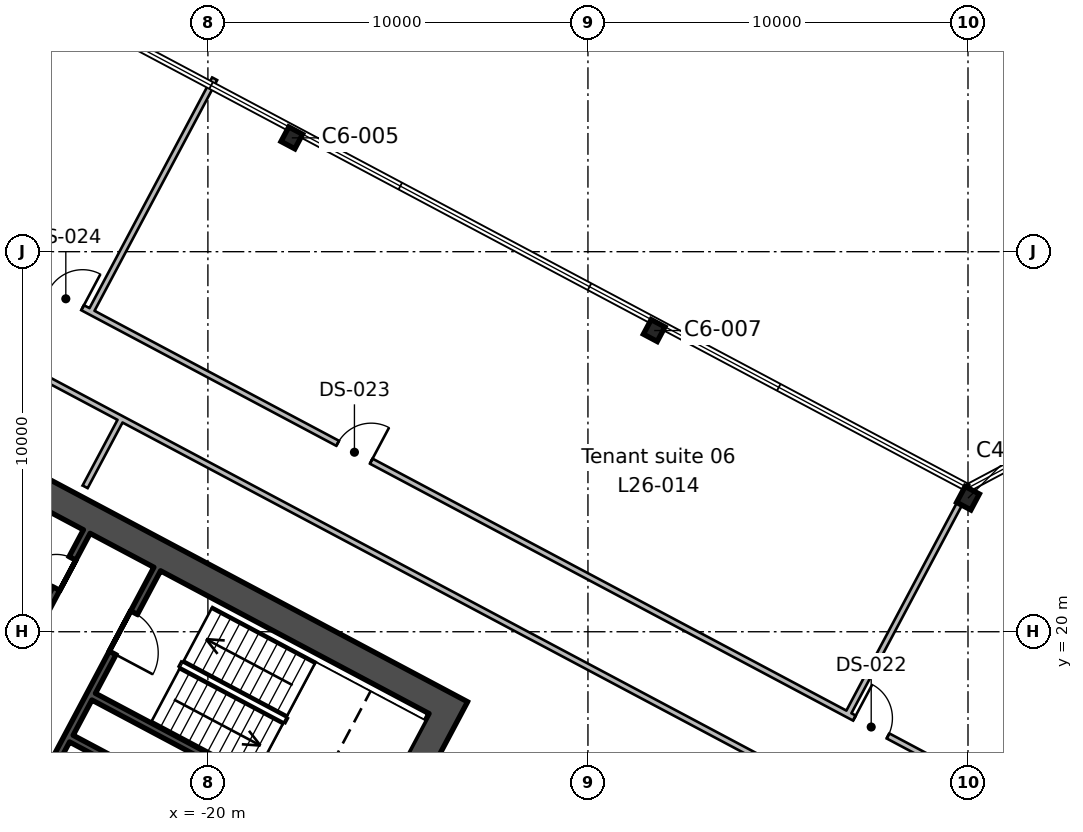
"""IFC4 building model, lengths in metres.
Left out: names, types, materials, properties, quantities, classifications, styles, units other than length and angle.
Written with IfcOpenShell. Run it as: python <this file> out.ifc"""

import sys

from ifc_helpers import new_model, si_unit, direction, frame, frame_2d, origin, origin_2d, place, context, subcontext, project, spatial, rectangle, i_section, extrude, element, fill, save


model = new_model("IFC4")
c1 = context("Model", 3, precision=1e-05, world=origin(), true_north=direction((0.0, 1.0)))
c2 = subcontext(c1, "Body", "Model", "MODEL_VIEW")
j1 = project(units=[si_unit("LENGTHUNIT", "METRE"), si_unit("PLANEANGLEUNIT", "RADIAN")], contexts=[c1])
p1 = place(None, origin())
s1 = spatial("IfcSite", under=j1, at=p1, CompositionType="ELEMENT")
p2 = place(p1, origin())
s2 = spatial("IfcBuilding", under=s1, at=p2, CompositionType="ELEMENT")
p3 = place(p2, frame((0.0, 0.0, 130.2)))
s3 = spatial("IfcBuildingStorey", under=s2, at=p3, CompositionType="ELEMENT", Elevation=130.2)
p4 = place(p3, frame((0.0, 23.514, 0.0), z_axis=(0.0, 0.0, 1.0), x_axis=(-0.882947592859, 0.469471562786, 0.0)))
e1 = element("IfcColumn", 1, at=p4, inside=s3, PredefinedType="COLUMN", context=c2, shape_type="SweptSolid", body=[
    extrude(i_section(OverallWidth=0.424, OverallDepth=0.475, WebThickness=0.048, FlangeThickness=0.077, FilletRadius=0.015, at=origin_2d()), origin(), (0.0, 0.0, 1.0), 4.0),
])
for number, where, z_axis, x_axis in (
    (2, (-8.257, 27.925, 0.0), (0.0, 0.0, 1.0), (-0.883, 0.469, 0.0)),
    (3, (-17.792, 32.995, 0.0), (0.0, 0.0, 1.0), (-0.883, 0.469, 0.0)),
):
    element("IfcColumn", number, at=place(p3, frame(where, z_axis=z_axis, x_axis=x_axis)), inside=s3, PredefinedType="COLUMN", context=c2, shape_type="SweptSolid", body=[
        extrude(i_section(OverallWidth=0.412, OverallDepth=0.434, WebThickness=0.036, FlangeThickness=0.057, FilletRadius=0.015, at=origin_2d()), origin(), (0.0, 0.0, 1.0), 4.0),
    ])
p5 = place(p3, frame((-13.498, 18.333, 0.0), z_axis=(0.0, 0.0, 1.0), x_axis=(-0.469469918705, -0.88294846703, 0.0)))
e4 = element("IfcWall", 4, at=p5, inside=s3, PredefinedType="SHEAR", context=c2, shape_type="SweptSolid", body=[
    extrude(rectangle(XDim=19.7, YDim=0.75, at=frame_2d((9.85, 0.0))), origin(), (0.0, 0.0, 1.0), 4.0),
])
p6 = place(p5, frame((6.85, 0.0, 0.0)))
e5 = element("IfcOpeningElement", 5, at=p6, cuts=e4, PredefinedType="OPENING", context=c2, shape_type="SweptSolid", body=[
    extrude(rectangle(XDim=2.4, YDim=2.4, at=frame_2d((1.2, 1.2))), frame((0.0, 0.385, 0.0), z_axis=(0.0, -1.0, 0.0), x_axis=(1.0, 0.0, 0.0)), (0.0, 0.0, 1.0), 0.77),
])
p7 = place(p3, frame((-14.005, 18.178, 0.0), z_axis=(0.0, 0.0, 1.0), x_axis=(-0.88295010195, 0.469466843842, 0.0)))
e6 = element("IfcWall", 6, at=p7, inside=s3, PredefinedType="SHEAR", context=c2, shape_type="SweptSolid", body=[
    extrude(rectangle(XDim=20.2, YDim=0.75, at=frame_2d((10.1, 0.0))), origin(), (0.0, 0.0, 1.0), 4.0),
])
p8 = place(p3, frame((-21.333, 21.649, 0.0), z_axis=(0.0, 0.0, 1.0), x_axis=(-0.469494272526, -0.882935517501, 0.0)))
e7 = element("IfcWall", 7, at=p8, inside=s3, PredefinedType="SHEAR", context=c2, shape_type="SweptSolid", body=[
    extrude(rectangle(XDim=7.3, YDim=0.2, at=frame_2d((3.65, 0.0))), origin(), (0.0, 0.0, 1.0), 4.0),
])
p9 = place(p8, frame((1.3, 0.0, 0.0)))
e8 = element("IfcOpeningElement", 8, at=p9, cuts=e7, PredefinedType="OPENING", context=c2, shape_type="SweptSolid", body=[
    extrude(rectangle(XDim=1.2, YDim=2.1, at=frame_2d((0.6, 1.05))), frame((0.0, 0.11, 0.0), z_axis=(0.0, -1.0, 0.0), x_axis=(1.0, 0.0, 0.0)), (0.0, 0.0, 1.0), 0.22),
])
p10 = place(p3, frame((-23.188, 22.635, 0.0), z_axis=(0.0, 0.0, 1.0), x_axis=(-0.469454336211, -0.882956752176, 0.0)))
e9 = element("IfcWall", 9, at=p10, inside=s3, PredefinedType="SHEAR", context=c2, shape_type="SweptSolid", body=[
    extrude(rectangle(XDim=7.3, YDim=0.2, at=frame_2d((3.65, 0.0))), origin(), (0.0, 0.0, 1.0), 4.0),
])
p11 = place(p10, frame((0.8, 0.0, 0.0)))
e10 = element("IfcOpeningElement", 10, at=p11, cuts=e9, PredefinedType="OPENING", context=c2, shape_type="SweptSolid", body=[
    extrude(rectangle(XDim=0.9, YDim=2.1, at=frame_2d((0.45, 1.05))), frame((0.0, 0.11, 0.0), z_axis=(0.0, -1.0, 0.0), x_axis=(1.0, 0.0, 0.0)), (0.0, 0.0, 1.0), 0.22),
])
p12 = place(p10, frame((3.3, 0.0, 0.0)))
e11 = element("IfcOpeningElement", 11, at=p12, cuts=e9, PredefinedType="OPENING", context=c2, shape_type="SweptSolid", body=[
    extrude(rectangle(XDim=0.9, YDim=2.1, at=frame_2d((0.45, 1.05))), frame((0.0, 0.11, 0.0), z_axis=(0.0, -1.0, 0.0), x_axis=(1.0, 0.0, 0.0)), (0.0, 0.0, 1.0), 0.22),
])
p13 = place(p3, frame((-15.942, 14.536, 0.0), z_axis=(0.0, 0.0, 1.0), x_axis=(-0.882946947542, 0.469472776449, 0.0)))
e12 = element("IfcWall", 12, at=p13, inside=s3, PredefinedType="SHEAR", context=c2, shape_type="SweptSolid", body=[
    extrude(rectangle(XDim=8.0, YDim=0.2, at=frame_2d((4.0, 0.0))), origin(), (0.0, 0.0, 1.0), 4.0),
])
p14 = place(p3, frame((-16.529, 13.432, 0.0), z_axis=(0.0, 0.0, 1.0), x_axis=(-0.88295287151, 0.469461634952, 0.0)))
e13 = element("IfcWall", 13, at=p14, inside=s3, PredefinedType="SHEAR", context=c2, shape_type="SweptSolid", body=[
    extrude(rectangle(XDim=8.0, YDim=0.2, at=frame_2d((4.0, 0.0))), origin(), (0.0, 0.0, 1.0), 4.0),
])
p15 = place(p3, frame((-33.0, 31.307, 0.0), z_axis=(0.0, 0.0, 1.0), x_axis=(0.882966008295, -0.469436926748, 0.0)))
e14 = element("IfcWall", 14, at=p15, inside=s3, PredefinedType="PARTITIONING", context=c2, shape_type="SweptSolid", body=[
    extrude(rectangle(XDim=12.144, YDim=0.15, at=frame_2d((6.072, 0.0))), origin(), (0.0, 0.0, 1.0), 3.64),
])
p16 = place(p3, frame((-19.822, 34.55, 0.0), z_axis=(0.0, 0.0, 1.0), x_axis=(-0.469455680488, -0.882956037443, 0.0)))
e15 = element("IfcWall", 15, at=p16, inside=s3, PredefinedType="PARTITIONING", context=c2, shape_type="SweptSolid", body=[
    extrude(rectangle(XDim=6.95, YDim=0.15, at=frame_2d((3.475, 0.0))), origin(), (0.0, 0.0, 1.0), 3.64),
])
p17 = place(p3, frame((-32.258, 33.291, 0.0), z_axis=(0.0, 0.0, 1.0), x_axis=(0.882945475173, -0.469475545552, 0.0)))
e16 = element("IfcWall", 16, at=p17, inside=s3, PredefinedType="PARTITIONING", context=c2, shape_type="SweptSolid", body=[
    extrude(rectangle(XDim=36.535, YDim=0.15, at=frame_2d((18.267, 0.0))), origin(), (0.0, 0.0, 1.0), 3.64),
])
p18 = place(p17, frame((33.15, 0.0, 0.0)))
e17 = element("IfcOpeningElement", 17, at=p18, cuts=e16, PredefinedType="OPENING", context=c2, shape_type="SweptSolid", body=[
    extrude(rectangle(XDim=1.0, YDim=2.1, at=frame_2d((0.5, 1.05))), frame((0.0, 0.085, 0.0), z_axis=(0.0, -1.0, 0.0), x_axis=(1.0, 0.0, 0.0)), (0.0, 0.0, 1.0), 0.17),
])
p19 = place(p17, frame((17.75, 0.0, 0.0)))
e18 = element("IfcOpeningElement", 18, at=p19, cuts=e16, PredefinedType="OPENING", context=c2, shape_type="SweptSolid", body=[
    extrude(rectangle(XDim=1.0, YDim=2.1, at=frame_2d((0.5, 1.05))), frame((0.0, 0.085, 0.0), z_axis=(0.0, -1.0, 0.0), x_axis=(1.0, 0.0, 0.0)), (0.0, 0.0, 1.0), 0.17),
])
p20 = place(p17, frame((9.149, 0.0, 0.0)))
e19 = element("IfcOpeningElement", 19, at=p20, cuts=e16, PredefinedType="OPENING", context=c2, shape_type="SweptSolid", body=[
    extrude(rectangle(XDim=1.0, YDim=2.1, at=frame_2d((0.5, 1.05))), frame((0.0, 0.085, 0.0), z_axis=(0.0, -1.0, 0.0), x_axis=(1.0, 0.0, 0.0)), (0.0, 0.0, 1.0), 0.17),
])
p21 = place(p3, frame((0.0, 16.139, 0.0), z_axis=(0.0, 0.0, 1.0), x_axis=(0.882958532279, 0.469450988151, 0.0)))
e20 = element("IfcWall", 20, at=p21, inside=s3, PredefinedType="PARTITIONING", context=c2, shape_type="SweptSolid", body=[
    extrude(rectangle(XDim=18.648, YDim=0.15, at=frame_2d((9.324, 0.0))), origin(), (0.0, 0.0, 1.0), 3.64),
])
p22 = place(p21, frame((14.25, 0.0, 0.0)))
e21 = element("IfcOpeningElement", 21, at=p22, cuts=e20, PredefinedType="OPENING", context=c2, shape_type="SweptSolid", body=[
    extrude(rectangle(XDim=1.0, YDim=2.1, at=frame_2d((0.5, 1.05))), frame((0.0, 0.085, 0.0), z_axis=(0.0, -1.0, 0.0), x_axis=(1.0, 0.0, 0.0)), (0.0, 0.0, 1.0), 0.17),
])
p23 = place(p3, frame((-22.277, 25.606, 0.0), z_axis=(0.0, 0.0, 1.0), x_axis=(-0.469295881328, -0.88304098193, 0.0)))
e22 = element("IfcWall", 22, at=p23, inside=s3, PredefinedType="PARTITIONING", context=c2, shape_type="SweptSolid", body=[
    extrude(rectangle(XDim=2.031, YDim=0.15, at=frame_2d((1.015, 0.0))), origin(), (0.0, 0.0, 1.0), 3.64),
])
p24 = place(p3, frame((-0.074, 13.8, 0.0), z_axis=(0.0, 0.0, 1.0), x_axis=(-0.8829426933, 0.4694807774, 0.0)))
e23 = element("IfcWall", 23, at=p24, inside=s3, PredefinedType="PARTITIONING", context=c2, shape_type="SweptSolid", body=[
    extrude(rectangle(XDim=25.147, YDim=0.15, at=frame_2d((12.573, 0.0))), origin(), (0.0, 0.0, 1.0), 3.64),
])
p25 = place(p3, frame((-0.224, 23.364, 0.0), z_axis=(0.0, 0.0, 1.0), x_axis=(-0.469363853193, -0.883004854639, 0.0)))
e24 = element("IfcWall", 24, at=p25, inside=s3, PredefinedType="PARTITIONING", context=c2, shape_type="SweptSolid", body=[
    extrude(rectangle(XDim=6.274, YDim=0.15, at=frame_2d((3.137, 0.0))), origin(), (0.0, 0.0, 1.0), 3.64),
])
p26 = place(p3, frame((29.614, 29.507, 0.0), z_axis=(0.0, 0.0, 1.0), x_axis=(-0.88294370404, -0.469478876518, 0.0)))
e25 = element("IfcWall", 25, at=p26, inside=s3, PredefinedType="PARTITIONING", context=c2, shape_type="SweptSolid", body=[
    extrude(rectangle(XDim=33.456, YDim=0.15, at=frame_2d((16.728, 0.0))), origin(), (0.0, 0.0, 1.0), 3.64),
])
p27 = place(p9, origin())
e26 = element("IfcDoor", 26, at=p27, inside=s3, OperationType="SINGLE_SWING_RIGHT", PredefinedType="DOOR", context=c2, shape_type="SweptSolid", body=[
    extrude(rectangle(XDim=1.2, YDim=2.1, at=frame_2d((0.6, 1.05))), frame((0.0, 0.025, 0.0), z_axis=(0.0, -1.0, 0.0), x_axis=(1.0, 0.0, 0.0)), (0.0, 0.0, 1.0), 0.05),
])
fill(e8, e26)
p28 = place(p11, frame((0.9, 0.0, 0.0), z_axis=(0.0, 0.0, 1.0), x_axis=(-1.0, 0.0, 0.0)))
e27 = element("IfcDoor", 27, at=p28, inside=s3, OperationType="SINGLE_SWING_LEFT", PredefinedType="DOOR", context=c2, shape_type="SweptSolid", body=[
    extrude(rectangle(XDim=0.9, YDim=2.1, at=frame_2d((0.45, 1.05))), frame((0.0, 0.025, 0.0), z_axis=(0.0, -1.0, 0.0), x_axis=(1.0, 0.0, 0.0)), (0.0, 0.0, 1.0), 0.05),
])
fill(e10, e27)
p29 = place(p18, origin())
e28 = element("IfcDoor", 28, at=p29, inside=s3, OperationType="SINGLE_SWING_LEFT", PredefinedType="DOOR", context=c2, shape_type="SweptSolid", body=[
    extrude(rectangle(XDim=1.0, YDim=2.1, at=frame_2d((0.5, 1.05))), frame((0.0, 0.025, 0.0), z_axis=(0.0, -1.0, 0.0), x_axis=(1.0, 0.0, 0.0)), (0.0, 0.0, 1.0), 0.05),
])
fill(e17, e28)
p30 = place(p19, origin())
e29 = element("IfcDoor", 29, at=p30, inside=s3, OperationType="SINGLE_SWING_RIGHT", PredefinedType="DOOR", context=c2, shape_type="SweptSolid", body=[
    extrude(rectangle(XDim=1.0, YDim=2.1, at=frame_2d((0.5, 1.05))), frame((0.0, 0.025, 0.0), z_axis=(0.0, -1.0, 0.0), x_axis=(1.0, 0.0, 0.0)), (0.0, 0.0, 1.0), 0.05),
])
fill(e18, e29)
p31 = place(p20, origin())
e30 = element("IfcDoor", 30, at=p31, inside=s3, OperationType="SINGLE_SWING_RIGHT", PredefinedType="DOOR", context=c2, shape_type="SweptSolid", body=[
    extrude(rectangle(XDim=1.0, YDim=2.1, at=frame_2d((0.5, 1.05))), frame((0.0, 0.025, 0.0), z_axis=(0.0, -1.0, 0.0), x_axis=(1.0, 0.0, 0.0)), (0.0, 0.0, 1.0), 0.05),
])
fill(e19, e30)
save(model, sys.argv[1])
